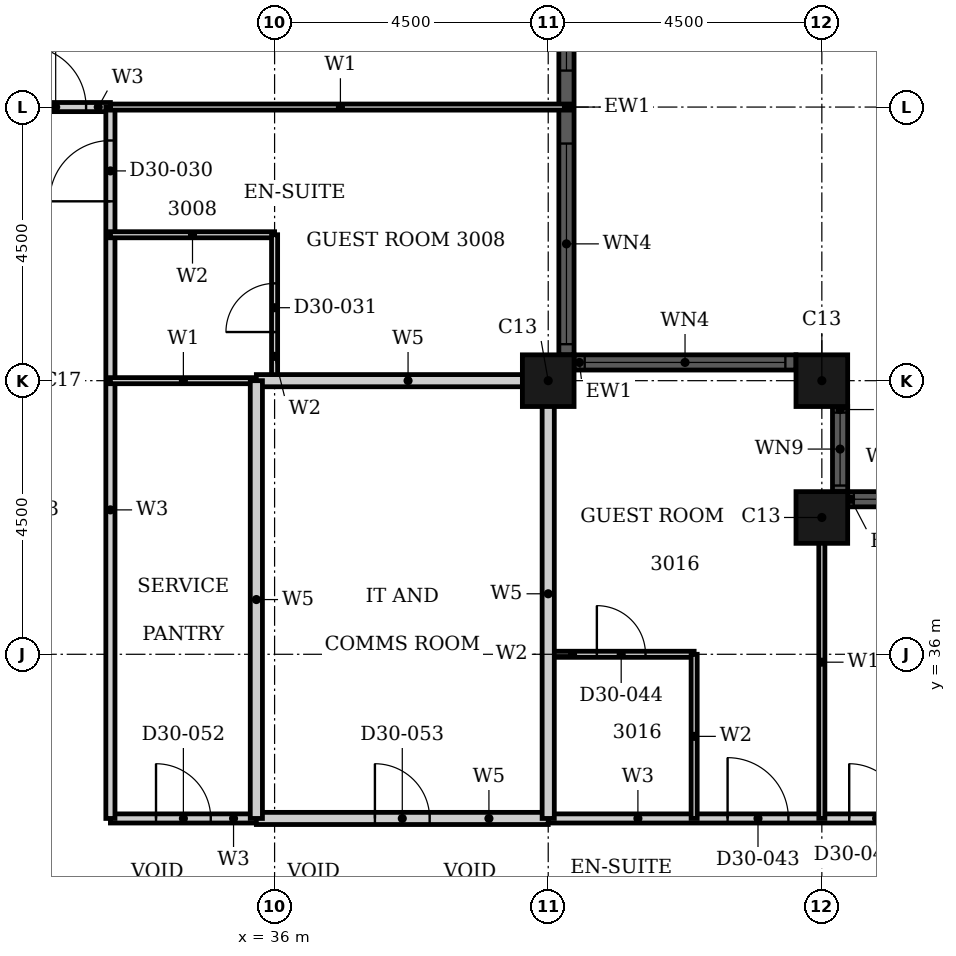
"""IFC4 building model, lengths in metres.
Left out: names, types, materials, properties, quantities, classifications, styles, units other than length and angle.
Written with IfcOpenShell. Run it as: python <this file> out.ifc"""

import sys

from ifc_helpers import new_model, si_unit, direction, frame, frame_2d, origin, origin_2d, place, context, subcontext, project, spatial, rectangle, hollow_rectangle, extrude, element, fill, save


model = new_model("IFC4")
c1 = context("Model", 3, precision=1e-05, world=origin(), true_north=direction((0.0, 1.0)))
c2 = subcontext(c1, "Body", "Model", "MODEL_VIEW")
j1 = project(units=[si_unit("LENGTHUNIT", "METRE"), si_unit("PLANEANGLEUNIT", "RADIAN")], contexts=[c1])
p1 = place(None, origin())
s1 = spatial("IfcSite", under=j1, at=p1, CompositionType="ELEMENT")
p2 = place(p1, origin())
s2 = spatial("IfcBuilding", under=s1, at=p2, CompositionType="ELEMENT")
p3 = place(p2, frame((0.0, 0.0, 122.4)))
s3 = spatial("IfcBuildingStorey", under=s2, at=p3, CompositionType="ELEMENT", Elevation=122.4)
for number, where, z_axis, x_axis in (
    (1, (45.0, 38.25, 0.0), (0.0, 0.0, 1.0), (1.0, 0.0, 0.0)),
    (2, (45.0, 40.5, 0.0), (0.0, 0.0, 1.0), (1.0, 0.0, 0.0)),
    (3, (40.5, 40.5, 0.0), (0.0, 0.0, 1.0), (1.0, 0.0, 0.0)),
):
    element("IfcColumn", number, at=place(p3, frame(where, z_axis=z_axis, x_axis=x_axis)), inside=s3, PredefinedType="COLUMN", context=c2, shape_type="SweptSolid", body=[
        extrude(hollow_rectangle(XDim=0.85, YDim=0.85, WallThickness=0.026, at=origin_2d()), origin(), (0.0, 0.0, 1.0), 3.6),
    ])
p4 = place(p3, frame((46.825, 38.55, 0.0), z_axis=(0.0, 0.0, 1.0), x_axis=(-1.0, 0.0, 0.0)))
e4 = element("IfcWall", 4, at=p4, inside=s3, PredefinedType="SOLIDWALL", context=c2, shape_type="SweptSolid", body=[
    extrude(rectangle(XDim=1.4, YDim=0.25, at=frame_2d((0.7, 0.0))), origin(), (0.0, 0.0, 1.0), 3.6),
])
p5 = place(p4, frame((0.1, 0.0, 0.9)))
e5 = element("IfcOpeningElement", 5, at=p5, cuts=e4, PredefinedType="OPENING", context=c2, shape_type="SweptSolid", body=[
    extrude(rectangle(XDim=1.2, YDim=2.08, at=frame_2d((0.6, 1.04))), frame((0.0, 0.135, 0.0), z_axis=(0.0, -1.0, 0.0), x_axis=(1.0, 0.0, 0.0)), (0.0, 0.0, 1.0), 0.27),
])
p6 = place(p3, frame((45.3, 38.675, 0.0), z_axis=(0.0, 0.0, 1.0), x_axis=(0.0, 1.0, 0.0)))
e6 = element("IfcWall", 6, at=p6, inside=s3, PredefinedType="SOLIDWALL", context=c2, shape_type="SweptSolid", body=[
    extrude(rectangle(XDim=1.4, YDim=0.25, at=frame_2d((0.7, 0.0))), origin(), (0.0, 0.0, 1.0), 3.6),
])
p7 = place(p6, frame((0.1, 0.0, 0.9)))
e7 = element("IfcOpeningElement", 7, at=p7, cuts=e6, PredefinedType="OPENING", context=c2, shape_type="SweptSolid", body=[
    extrude(rectangle(XDim=1.2, YDim=2.08, at=frame_2d((0.6, 1.04))), frame((0.0, 0.135, 0.0), z_axis=(0.0, -1.0, 0.0), x_axis=(1.0, 0.0, 0.0)), (0.0, 0.0, 1.0), 0.27),
])
p8 = place(p3, frame((44.575, 40.8, 0.0), z_axis=(0.0, 0.0, 1.0), x_axis=(-1.0, 0.0, 0.0)))
e8 = element("IfcWall", 8, at=p8, inside=s3, PredefinedType="SOLIDWALL", context=c2, shape_type="SweptSolid", body=[
    extrude(rectangle(XDim=3.65, YDim=0.25, at=frame_2d((1.825, 0.0))), origin(), (0.0, 0.0, 1.0), 3.6),
])
p9 = place(p8, frame((0.175, 0.0, 0.9)))
e9 = element("IfcOpeningElement", 9, at=p9, cuts=e8, PredefinedType="OPENING", context=c2, shape_type="SweptSolid", body=[
    extrude(rectangle(XDim=3.3, YDim=2.08, at=frame_2d((1.65, 1.04))), frame((0.0, 0.135, 0.0), z_axis=(0.0, -1.0, 0.0), x_axis=(1.0, 0.0, 0.0)), (0.0, 0.0, 1.0), 0.27),
])
p10 = place(p3, frame((40.8, 40.925, 0.0), z_axis=(0.0, 0.0, 1.0), x_axis=(0.0, 1.0, 0.0)))
e10 = element("IfcWall", 10, at=p10, inside=s3, PredefinedType="SOLIDWALL", context=c2, shape_type="SweptSolid", body=[
    extrude(rectangle(XDim=8.15, YDim=0.25, at=frame_2d((4.075, 0.0))), origin(), (0.0, 0.0, 1.0), 3.6),
])
p11 = place(p10, frame((0.175, 0.0, 0.9)))
e11 = element("IfcOpeningElement", 11, at=p11, cuts=e10, PredefinedType="OPENING", context=c2, shape_type="SweptSolid", body=[
    extrude(rectangle(XDim=3.3, YDim=2.08, at=frame_2d((1.65, 1.04))), frame((0.0, 0.135, 0.0), z_axis=(0.0, -1.0, 0.0), x_axis=(1.0, 0.0, 0.0)), (0.0, 0.0, 1.0), 0.27),
])
p12 = place(p10, frame((4.675, 0.0, 0.9)))
e12 = element("IfcOpeningElement", 12, at=p12, cuts=e10, PredefinedType="OPENING", context=c2, shape_type="SweptSolid", body=[
    extrude(rectangle(XDim=3.3, YDim=2.08, at=frame_2d((1.65, 1.04))), frame((0.0, 0.135, 0.0), z_axis=(0.0, -1.0, 0.0), x_axis=(1.0, 0.0, 0.0)), (0.0, 0.0, 1.0), 0.27),
])
p13 = place(p3, frame((40.5, 33.3, 0.0), z_axis=(0.0, 0.0, 1.0), x_axis=(1.0, 0.0, 0.0)))
e13 = element("IfcWall", 13, at=p13, inside=s3, PredefinedType="PARTITIONING", context=c2, shape_type="SweptSolid", body=[
    extrude(rectangle(XDim=6.3, YDim=0.15, at=frame_2d((3.15, 0.0))), origin(), (0.0, 0.0, 1.0), 3.3),
])
p14 = place(p13, frame((2.95, 0.0, 0.0)))
e14 = element("IfcOpeningElement", 14, at=p14, cuts=e13, PredefinedType="OPENING", context=c2, shape_type="SweptSolid", body=[
    extrude(rectangle(XDim=1.0, YDim=2.1, at=frame_2d((0.5, 1.05))), frame((0.0, 0.085, 0.0), z_axis=(0.0, -1.0, 0.0), x_axis=(1.0, 0.0, 0.0)), (0.0, 0.0, 1.0), 0.17),
])
p15 = place(p13, frame((4.95, 0.0, 0.0)))
e15 = element("IfcOpeningElement", 15, at=p15, cuts=e13, PredefinedType="OPENING", context=c2, shape_type="SweptSolid", body=[
    extrude(rectangle(XDim=0.9, YDim=2.1, at=frame_2d((0.45, 1.05))), frame((0.0, 0.085, 0.0), z_axis=(0.0, -1.0, 0.0), x_axis=(1.0, 0.0, 0.0)), (0.0, 0.0, 1.0), 0.17),
])
p16 = place(p3, frame((33.3, 33.3, 0.0), z_axis=(0.0, 0.0, 1.0), x_axis=(1.0, 0.0, 0.0)))
e16 = element("IfcWall", 16, at=p16, inside=s3, PredefinedType="PARTITIONING", context=c2, shape_type="SweptSolid", body=[
    extrude(rectangle(XDim=2.4, YDim=0.15, at=frame_2d((1.2, 0.0))), origin(), (0.0, 0.0, 1.0), 3.3),
])
p17 = place(p16, frame((0.75, 0.0, 0.0)))
e17 = element("IfcOpeningElement", 17, at=p17, cuts=e16, PredefinedType="OPENING", context=c2, shape_type="SweptSolid", body=[
    extrude(rectangle(XDim=0.9, YDim=2.1, at=frame_2d((0.45, 1.05))), frame((0.0, 0.085, 0.0), z_axis=(0.0, -1.0, 0.0), x_axis=(1.0, 0.0, 0.0)), (0.0, 0.0, 1.0), 0.17),
])
p18 = place(p3, frame((31.5, 45.0, 0.0), z_axis=(0.0, 0.0, 1.0), x_axis=(1.0, 0.0, 0.0)))
e18 = element("IfcWall", 18, at=p18, inside=s3, PredefinedType="PARTITIONING", context=c2, shape_type="SweptSolid", body=[
    extrude(rectangle(XDim=1.8, YDim=0.15, at=frame_2d((0.9, 0.0))), origin(), (0.0, 0.0, 1.0), 3.3),
])
p19 = place(p18, frame((0.4, 0.0, 0.0)))
e19 = element("IfcOpeningElement", 19, at=p19, cuts=e18, PredefinedType="OPENING", context=c2, shape_type="SweptSolid", body=[
    extrude(rectangle(XDim=1.0, YDim=2.1, at=frame_2d((0.5, 1.05))), frame((0.0, 0.085, 0.0), z_axis=(0.0, -1.0, 0.0), x_axis=(1.0, 0.0, 0.0)), (0.0, 0.0, 1.0), 0.17),
])
p20 = place(p3, frame((33.3, 33.3, 0.0), z_axis=(0.0, 0.0, 1.0), x_axis=(0.0, 1.0, 0.0)))
e20 = element("IfcWall", 20, at=p20, inside=s3, PredefinedType="PARTITIONING", context=c2, shape_type="SweptSolid", body=[
    extrude(rectangle(XDim=11.7, YDim=0.15, at=frame_2d((5.85, 0.0))), origin(), (0.0, 0.0, 1.0), 3.3),
])
p21 = place(p20, frame((10.15, 0.0, 0.0)))
e21 = element("IfcOpeningElement", 21, at=p21, cuts=e20, PredefinedType="OPENING", context=c2, shape_type="SweptSolid", body=[
    extrude(rectangle(XDim=1.0, YDim=2.1, at=frame_2d((0.5, 1.05))), frame((0.0, 0.085, 0.0), z_axis=(0.0, -1.0, 0.0), x_axis=(1.0, 0.0, 0.0)), (0.0, 0.0, 1.0), 0.17),
])
p22 = place(p3, frame((33.3, 40.5, 0.0), z_axis=(0.0, 0.0, 1.0), x_axis=(1.0, 0.0, 0.0)))
e22 = element("IfcWall", 22, at=p22, inside=s3, PredefinedType="PARTITIONING", context=c2, shape_type="SweptSolid", body=[
    extrude(rectangle(XDim=2.4, YDim=0.1, at=frame_2d((1.2, 0.0))), origin(), (0.0, 0.0, 1.0), 2.38),
])
p23 = place(p3, frame((33.3, 45.0, 0.0), z_axis=(0.0, 0.0, 1.0), x_axis=(1.0, 0.0, 0.0)))
e23 = element("IfcWall", 23, at=p23, inside=s3, PredefinedType="PARTITIONING", context=c2, shape_type="SweptSolid", body=[
    extrude(rectangle(XDim=7.565, YDim=0.1, at=frame_2d((3.782, 0.0))), origin(), (0.0, 0.0, 1.0), 3.3),
])
p24 = place(p3, frame((45.0, 33.3, 0.0), z_axis=(0.0, 0.0, 1.0), x_axis=(0.0, 1.0, 0.0)))
e24 = element("IfcWall", 24, at=p24, inside=s3, PredefinedType="PARTITIONING", context=c2, shape_type="SweptSolid", body=[
    extrude(rectangle(XDim=5.14, YDim=0.1, at=frame_2d((2.57, 0.0))), origin(), (0.0, 0.0, 1.0), 3.3),
])
p25 = place(p3, frame((40.5, 36.0, 0.0), z_axis=(0.0, 0.0, 1.0), x_axis=(1.0, 0.0, 0.0)))
e25 = element("IfcWall", 25, at=p25, inside=s3, PredefinedType="PARTITIONING", context=c2, shape_type="SweptSolid", body=[
    extrude(rectangle(XDim=2.4, YDim=0.1, at=frame_2d((1.2, 0.0))), origin(), (0.0, 0.0, 1.0), 3.3),
])
p26 = place(p25, frame((0.8, 0.0, 0.0)))
e26 = element("IfcOpeningElement", 26, at=p26, cuts=e25, PredefinedType="OPENING", context=c2, shape_type="SweptSolid", body=[
    extrude(rectangle(XDim=0.8, YDim=2.1, at=frame_2d((0.4, 1.05))), frame((0.0, 0.06, 0.0), z_axis=(0.0, -1.0, 0.0), x_axis=(1.0, 0.0, 0.0)), (0.0, 0.0, 1.0), 0.12),
])
p27 = place(p3, frame((33.3, 42.9, 0.0), z_axis=(0.0, 0.0, 1.0), x_axis=(1.0, 0.0, 0.0)))
e27 = element("IfcWall", 27, at=p27, inside=s3, PredefinedType="PARTITIONING", context=c2, shape_type="SweptSolid", body=[
    extrude(rectangle(XDim=2.7, YDim=0.1, at=frame_2d((1.35, 0.0))), origin(), (0.0, 0.0, 1.0), 3.3),
])
p28 = place(p3, frame((36.0, 40.5, 0.0), z_axis=(0.0, 0.0, 1.0), x_axis=(0.0, 1.0, 0.0)))
e28 = element("IfcWall", 28, at=p28, inside=s3, PredefinedType="PARTITIONING", context=c2, shape_type="SweptSolid", body=[
    extrude(rectangle(XDim=2.4, YDim=0.1, at=frame_2d((1.2, 0.0))), origin(), (0.0, 0.0, 1.0), 2.58),
])
p29 = place(p28, frame((0.8, 0.0, 0.0)))
e29 = element("IfcOpeningElement", 29, at=p29, cuts=e28, PredefinedType="OPENING", context=c2, shape_type="SweptSolid", body=[
    extrude(rectangle(XDim=0.8, YDim=2.1, at=frame_2d((0.4, 1.05))), frame((0.0, 0.06, 0.0), z_axis=(0.0, -1.0, 0.0), x_axis=(1.0, 0.0, 0.0)), (0.0, 0.0, 1.0), 0.12),
])
p30 = place(p3, frame((42.9, 33.3, 0.0), z_axis=(0.0, 0.0, 1.0), x_axis=(0.0, 1.0, 0.0)))
e30 = element("IfcWall", 30, at=p30, inside=s3, PredefinedType="PARTITIONING", context=c2, shape_type="SweptSolid", body=[
    extrude(rectangle(XDim=2.7, YDim=0.1, at=frame_2d((1.35, 0.0))), origin(), (0.0, 0.0, 1.0), 3.3),
])
p31 = place(p3, frame((35.7, 33.3, 0.0), z_axis=(0.0, 0.0, 1.0), x_axis=(1.0, 0.0, 0.0)))
e31 = element("IfcWall", 31, at=p31, inside=s3, PredefinedType="PARTITIONING", context=c2, shape_type="SweptSolid", body=[
    extrude(rectangle(XDim=4.8, YDim=0.2, at=frame_2d((2.4, 0.0))), origin(), (0.0, 0.0, 1.0), 3.3),
])
p32 = place(p31, frame((1.95, 0.0, 0.0)))
e32 = element("IfcOpeningElement", 32, at=p32, cuts=e31, PredefinedType="OPENING", context=c2, shape_type="SweptSolid", body=[
    extrude(rectangle(XDim=0.9, YDim=2.1, at=frame_2d((0.45, 1.05))), frame((0.0, 0.11, 0.0), z_axis=(0.0, -1.0, 0.0), x_axis=(1.0, 0.0, 0.0)), (0.0, 0.0, 1.0), 0.22),
])
p33 = place(p3, frame((35.7, 40.5, 0.0), z_axis=(0.0, 0.0, 1.0), x_axis=(1.0, 0.0, 0.0)))
e33 = element("IfcWall", 33, at=p33, inside=s3, PredefinedType="PARTITIONING", context=c2, shape_type="SweptSolid", body=[
    extrude(rectangle(XDim=4.99, YDim=0.2, at=frame_2d((2.495, 0.0))), origin(), (0.0, 0.0, 1.0), 2.38),
])
p34 = place(p3, frame((35.7, 33.3, 0.0), z_axis=(0.0, 0.0, 1.0), x_axis=(0.0, 1.0, 0.0)))
e34 = element("IfcWall", 34, at=p34, inside=s3, PredefinedType="PARTITIONING", context=c2, shape_type="SweptSolid", body=[
    extrude(rectangle(XDim=7.2, YDim=0.2, at=frame_2d((3.6, 0.0))), origin(), (0.0, 0.0, 1.0), 3.3),
])
p35 = place(p3, frame((40.5, 33.3, 0.0), z_axis=(0.0, 0.0, 1.0), x_axis=(0.0, 1.0, 0.0)))
e35 = element("IfcWall", 35, at=p35, inside=s3, PredefinedType="PARTITIONING", context=c2, shape_type="SweptSolid", body=[
    extrude(rectangle(XDim=7.39, YDim=0.2, at=frame_2d((3.695, 0.0))), origin(), (0.0, 0.0, 1.0), 3.3),
])
p36 = place(p5, origin())
e36 = element("IfcWindow", 36, at=p36, inside=s3, PartitioningType="SINGLE_PANEL", PredefinedType="WINDOW", context=c2, shape_type="SweptSolid", body=[
    extrude(rectangle(XDim=1.2, YDim=2.08, at=frame_2d((0.6, 1.04))), frame((0.0, 0.03, 0.0), z_axis=(0.0, -1.0, 0.0), x_axis=(1.0, 0.0, 0.0)), (0.0, 0.0, 1.0), 0.06),
])
fill(e5, e36)
p37 = place(p7, origin())
e37 = element("IfcWindow", 37, at=p37, inside=s3, PartitioningType="SINGLE_PANEL", PredefinedType="WINDOW", context=c2, shape_type="SweptSolid", body=[
    extrude(rectangle(XDim=1.2, YDim=2.08, at=frame_2d((0.6, 1.04))), frame((0.0, 0.03, 0.0), z_axis=(0.0, -1.0, 0.0), x_axis=(1.0, 0.0, 0.0)), (0.0, 0.0, 1.0), 0.06),
])
fill(e7, e37)
p38 = place(p9, origin())
e38 = element("IfcWindow", 38, at=p38, inside=s3, PartitioningType="SINGLE_PANEL", PredefinedType="WINDOW", context=c2, shape_type="SweptSolid", body=[
    extrude(rectangle(XDim=3.3, YDim=2.08, at=frame_2d((1.65, 1.04))), frame((0.0, 0.03, 0.0), z_axis=(0.0, -1.0, 0.0), x_axis=(1.0, 0.0, 0.0)), (0.0, 0.0, 1.0), 0.06),
])
fill(e9, e38)
p39 = place(p11, origin())
e39 = element("IfcWindow", 39, at=p39, inside=s3, PartitioningType="SINGLE_PANEL", PredefinedType="WINDOW", context=c2, shape_type="SweptSolid", body=[
    extrude(rectangle(XDim=3.3, YDim=2.08, at=frame_2d((1.65, 1.04))), frame((0.0, 0.03, 0.0), z_axis=(0.0, -1.0, 0.0), x_axis=(1.0, 0.0, 0.0)), (0.0, 0.0, 1.0), 0.06),
])
fill(e11, e39)
p40 = place(p12, origin())
e40 = element("IfcWindow", 40, at=p40, inside=s3, PartitioningType="SINGLE_PANEL", PredefinedType="WINDOW", context=c2, shape_type="SweptSolid", body=[
    extrude(rectangle(XDim=3.3, YDim=2.08, at=frame_2d((1.65, 1.04))), frame((0.0, 0.03, 0.0), z_axis=(0.0, -1.0, 0.0), x_axis=(1.0, 0.0, 0.0)), (0.0, 0.0, 1.0), 0.06),
])
fill(e12, e40)
p41 = place(p21, origin())
e41 = element("IfcDoor", 41, at=p41, inside=s3, OperationType="SINGLE_SWING_RIGHT", PredefinedType="DOOR", context=c2, shape_type="SweptSolid", body=[
    extrude(rectangle(XDim=1.0, YDim=2.1, at=frame_2d((0.5, 1.05))), frame((0.0, 0.025, 0.0), z_axis=(0.0, -1.0, 0.0), x_axis=(1.0, 0.0, 0.0)), (0.0, 0.0, 1.0), 0.05),
])
fill(e21, e41)
p42 = place(p29, origin())
e42 = element("IfcDoor", 42, at=p42, inside=s3, OperationType="SINGLE_SWING_RIGHT", PredefinedType="DOOR", context=c2, shape_type="SweptSolid", body=[
    extrude(rectangle(XDim=0.8, YDim=2.1, at=frame_2d((0.4, 1.05))), frame((0.0, 0.025, 0.0), z_axis=(0.0, -1.0, 0.0), x_axis=(1.0, 0.0, 0.0)), (0.0, 0.0, 1.0), 0.05),
])
fill(e29, e42)
p43 = place(p19, origin())
e43 = element("IfcDoor", 43, at=p43, inside=s3, OperationType="SINGLE_SWING_LEFT", PredefinedType="DOOR", context=c2, shape_type="SweptSolid", body=[
    extrude(rectangle(XDim=1.0, YDim=2.1, at=frame_2d((0.5, 1.05))), frame((0.0, 0.025, 0.0), z_axis=(0.0, -1.0, 0.0), x_axis=(1.0, 0.0, 0.0)), (0.0, 0.0, 1.0), 0.05),
])
fill(e19, e43)
p44 = place(p14, origin())
e44 = element("IfcDoor", 44, at=p44, inside=s3, OperationType="SINGLE_SWING_RIGHT", PredefinedType="DOOR", context=c2, shape_type="SweptSolid", body=[
    extrude(rectangle(XDim=1.0, YDim=2.1, at=frame_2d((0.5, 1.05))), frame((0.0, 0.025, 0.0), z_axis=(0.0, -1.0, 0.0), x_axis=(1.0, 0.0, 0.0)), (0.0, 0.0, 1.0), 0.05),
])
fill(e14, e44)
p45 = place(p26, origin())
e45 = element("IfcDoor", 45, at=p45, inside=s3, OperationType="SINGLE_SWING_RIGHT", PredefinedType="DOOR", context=c2, shape_type="SweptSolid", body=[
    extrude(rectangle(XDim=0.8, YDim=2.1, at=frame_2d((0.4, 1.05))), frame((0.0, 0.025, 0.0), z_axis=(0.0, -1.0, 0.0), x_axis=(1.0, 0.0, 0.0)), (0.0, 0.0, 1.0), 0.05),
])
fill(e26, e45)
p46 = place(p15, origin())
e46 = element("IfcDoor", 46, at=p46, inside=s3, OperationType="SINGLE_SWING_RIGHT", PredefinedType="DOOR", context=c2, shape_type="SweptSolid", body=[
    extrude(rectangle(XDim=0.9, YDim=2.1, at=frame_2d((0.45, 1.05))), frame((0.0, 0.025, 0.0), z_axis=(0.0, -1.0, 0.0), x_axis=(1.0, 0.0, 0.0)), (0.0, 0.0, 1.0), 0.05),
])
fill(e15, e46)
p47 = place(p17, origin())
e47 = element("IfcDoor", 47, at=p47, inside=s3, OperationType="SINGLE_SWING_RIGHT", PredefinedType="DOOR", context=c2, shape_type="SweptSolid", body=[
    extrude(rectangle(XDim=0.9, YDim=2.1, at=frame_2d((0.45, 1.05))), frame((0.0, 0.025, 0.0), z_axis=(0.0, -1.0, 0.0), x_axis=(1.0, 0.0, 0.0)), (0.0, 0.0, 1.0), 0.05),
])
fill(e17, e47)
p48 = place(p32, origin())
e48 = element("IfcDoor", 48, at=p48, inside=s3, OperationType="SINGLE_SWING_RIGHT", PredefinedType="DOOR", context=c2, shape_type="SweptSolid", body=[
    extrude(rectangle(XDim=0.9, YDim=2.1, at=frame_2d((0.45, 1.05))), frame((0.0, 0.025, 0.0), z_axis=(0.0, -1.0, 0.0), x_axis=(1.0, 0.0, 0.0)), (0.0, 0.0, 1.0), 0.05),
])
fill(e32, e48)
save(model, sys.argv[1])
